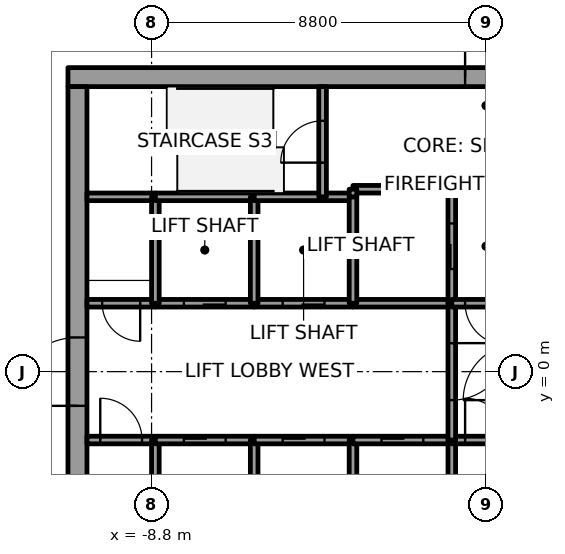
"""IFC4 building model, lengths in metres.
Left out: names, types, materials, properties, quantities, classifications, styles, units other than length and angle.
Written with IfcOpenShell. Run it as: python <this file> out.ifc"""

import sys

from ifc_helpers import new_model, si_unit, direction, frame, frame_2d, origin, place, context, subcontext, project, spatial, rectangle, extrude, element, fill, save


model = new_model("IFC4")
c1 = context("Model", 3, precision=1e-05, world=origin(), true_north=direction((0.0, 1.0)))
c2 = subcontext(c1, "Body", "Model", "MODEL_VIEW")
j1 = project(units=[si_unit("LENGTHUNIT", "METRE"), si_unit("PLANEANGLEUNIT", "RADIAN")], contexts=[c1])
p1 = place(None, origin())
s1 = spatial("IfcSite", under=j1, at=p1, CompositionType="ELEMENT")
p2 = place(p1, origin())
s2 = spatial("IfcBuilding", under=s1, at=p2, CompositionType="ELEMENT")
p3 = place(p2, frame((0.0, 0.0, 118.6)))
s3 = spatial("IfcBuildingStorey", under=s2, at=p3, CompositionType="ELEMENT", Elevation=118.6)
p4 = place(p3, frame((-11.0, 7.75, 0.0), z_axis=(0.0, 0.0, 1.0), x_axis=(1.0, 0.0, 0.0)))
e1 = element("IfcWall", 1, at=p4, inside=s3, PredefinedType="SHEAR", context=c2, shape_type="SweptSolid", body=[
    extrude(rectangle(XDim=22.0, YDim=0.5, at=frame_2d((11.0, 0.0))), origin(), (0.0, 0.0, 1.0), 7.2),
])
p5 = place(p4, frame((10.45, 0.0, 0.0)))
e2 = element("IfcOpeningElement", 2, at=p5, cuts=e1, PredefinedType="OPENING", context=c2, shape_type="SweptSolid", body=[
    extrude(rectangle(XDim=1.1, YDim=2.1, at=frame_2d((0.55, 1.05))), frame((0.0, 0.25, 0.0), z_axis=(0.0, -1.0, 0.0), x_axis=(1.0, 0.0, 0.0)), (0.0, 0.0, 1.0), 0.5),
])
p6 = place(p3, frame((-10.75, -7.5, 0.0), z_axis=(0.0, 0.0, 1.0), x_axis=(0.0, 1.0, 0.0)))
e3 = element("IfcWall", 3, at=p6, inside=s3, PredefinedType="SHEAR", context=c2, shape_type="SweptSolid", body=[
    extrude(rectangle(XDim=15.0, YDim=0.5, at=frame_2d((7.5, 0.0))), origin(), (0.0, 0.0, 1.0), 7.2),
])
p7 = place(p6, frame((6.6, 0.0, 0.0)))
e4 = element("IfcOpeningElement", 4, at=p7, cuts=e3, PredefinedType="OPENING", context=c2, shape_type="SweptSolid", body=[
    extrude(rectangle(XDim=1.8, YDim=2.1, at=frame_2d((0.9, 1.05))), frame((0.0, 0.25, 0.0), z_axis=(0.0, -1.0, 0.0), x_axis=(1.0, 0.0, 0.0)), (0.0, 0.0, 1.0), 0.5),
])
p8 = place(p3, frame((-10.5, -1.8, 0.0), z_axis=(0.0, 0.0, 1.0), x_axis=(1.0, 0.0, 0.0)))
e5 = element("IfcWall", 5, at=p8, inside=s3, PredefinedType="SOLIDWALL", context=c2, shape_type="SweptSolid", body=[
    extrude(rectangle(XDim=1.8, YDim=0.2, at=frame_2d((0.9, 0.0))), origin(), (0.0, 0.0, 1.0), 7.05),
])
p9 = place(p8, frame((0.35, 0.0, 0.0)))
e6 = element("IfcOpeningElement", 6, at=p9, cuts=e5, PredefinedType="OPENING", context=c2, shape_type="SweptSolid", body=[
    extrude(rectangle(XDim=1.1, YDim=2.1, at=frame_2d((0.55, 1.05))), frame((0.0, 0.1, 0.0), z_axis=(0.0, -1.0, 0.0), x_axis=(1.0, 0.0, 0.0)), (0.0, 0.0, 1.0), 0.2),
])
p10 = place(p3, frame((-8.7, 1.8, 0.0), z_axis=(0.0, 0.0, 1.0), x_axis=(-1.0, 0.0, 0.0)))
e7 = element("IfcWall", 7, at=p10, inside=s3, PredefinedType="SOLIDWALL", context=c2, shape_type="SweptSolid", body=[
    extrude(rectangle(XDim=1.8, YDim=0.2, at=frame_2d((0.9, 0.0))), origin(), (0.0, 0.0, 1.0), 7.05),
])
p11 = place(p10, frame((0.4, 0.0, 0.0)))
e8 = element("IfcOpeningElement", 8, at=p11, cuts=e7, PredefinedType="OPENING", context=c2, shape_type="SweptSolid", body=[
    extrude(rectangle(XDim=1.0, YDim=2.1, at=frame_2d((0.5, 1.05))), frame((0.0, 0.1, 0.0), z_axis=(0.0, -1.0, 0.0), x_axis=(1.0, 0.0, 0.0)), (0.0, 0.0, 1.0), 0.2),
])
p12 = place(p3, frame((-8.7, 4.6, 0.0), z_axis=(0.0, 0.0, 1.0), x_axis=(-1.0, 0.0, 0.0)))
e9 = element("IfcWall", 9, at=p12, inside=s3, PredefinedType="SOLIDWALL", context=c2, shape_type="SweptSolid", body=[
    extrude(rectangle(XDim=1.8, YDim=0.2, at=frame_2d((0.9, 0.0))), origin(), (0.0, 0.0, 1.0), 7.05),
])
p13 = place(p3, frame((-8.7, -4.6, 0.0), z_axis=(0.0, 0.0, 1.0), x_axis=(0.0, 1.0, 0.0)))
e10 = element("IfcWall", 10, at=p13, inside=s3, PredefinedType="SOLIDWALL", context=c2, shape_type="SweptSolid", body=[
    extrude(rectangle(XDim=2.8, YDim=0.2, at=frame_2d((1.4, 0.0))), origin(), (0.0, 0.0, 1.0), 7.05),
])
p14 = place(p3, frame((-8.7, -1.8, 0.0), z_axis=(0.0, 0.0, 1.0), x_axis=(1.0, 0.0, 0.0)))
e11 = element("IfcWall", 11, at=p14, inside=s3, PredefinedType="SOLIDWALL", context=c2, shape_type="SweptSolid", body=[
    extrude(rectangle(XDim=2.6, YDim=0.2, at=frame_2d((1.3, 0.0))), origin(), (0.0, 0.0, 1.0), 7.05),
])
p15 = place(p14, frame((0.75, 0.0, 0.0)))
e12 = element("IfcOpeningElement", 12, at=p15, cuts=e11, PredefinedType="OPENING", context=c2, shape_type="SweptSolid", body=[
    extrude(rectangle(XDim=1.1, YDim=2.1, at=frame_2d((0.55, 1.05))), frame((0.0, 0.1, 0.0), z_axis=(0.0, -1.0, 0.0), x_axis=(1.0, 0.0, 0.0)), (0.0, 0.0, 1.0), 0.2),
])
p16 = place(p3, frame((-6.1, 1.8, 0.0), z_axis=(0.0, 0.0, 1.0), x_axis=(-1.0, 0.0, 0.0)))
e13 = element("IfcWall", 13, at=p16, inside=s3, PredefinedType="SOLIDWALL", context=c2, shape_type="SweptSolid", body=[
    extrude(rectangle(XDim=2.6, YDim=0.2, at=frame_2d((1.3, 0.0))), origin(), (0.0, 0.0, 1.0), 7.05),
])
p17 = place(p16, frame((0.75, 0.0, 0.0)))
e14 = element("IfcOpeningElement", 14, at=p17, cuts=e13, PredefinedType="OPENING", context=c2, shape_type="SweptSolid", body=[
    extrude(rectangle(XDim=1.1, YDim=2.1, at=frame_2d((0.55, 1.05))), frame((0.0, 0.1, 0.0), z_axis=(0.0, -1.0, 0.0), x_axis=(1.0, 0.0, 0.0)), (0.0, 0.0, 1.0), 0.2),
])
p18 = place(p3, frame((-8.7, 1.8, 0.0), z_axis=(0.0, 0.0, 1.0), x_axis=(0.0, 1.0, 0.0)))
e15 = element("IfcWall", 15, at=p18, inside=s3, PredefinedType="SOLIDWALL", context=c2, shape_type="SweptSolid", body=[
    extrude(rectangle(XDim=2.8, YDim=0.2, at=frame_2d((1.4, 0.0))), origin(), (0.0, 0.0, 1.0), 7.05),
])
p19 = place(p3, frame((-6.1, 4.6, 0.0), z_axis=(0.0, 0.0, 1.0), x_axis=(-1.0, 0.0, 0.0)))
e16 = element("IfcWall", 16, at=p19, inside=s3, PredefinedType="SOLIDWALL", context=c2, shape_type="SweptSolid", body=[
    extrude(rectangle(XDim=2.6, YDim=0.2, at=frame_2d((1.3, 0.0))), origin(), (0.0, 0.0, 1.0), 7.05),
])
p20 = place(p3, frame((-6.1, -4.6, 0.0), z_axis=(0.0, 0.0, 1.0), x_axis=(0.0, 1.0, 0.0)))
e17 = element("IfcWall", 17, at=p20, inside=s3, PredefinedType="SOLIDWALL", context=c2, shape_type="SweptSolid", body=[
    extrude(rectangle(XDim=2.8, YDim=0.2, at=frame_2d((1.4, 0.0))), origin(), (0.0, 0.0, 1.0), 7.05),
])
p21 = place(p3, frame((-6.1, -1.8, 0.0), z_axis=(0.0, 0.0, 1.0), x_axis=(1.0, 0.0, 0.0)))
e18 = element("IfcWall", 18, at=p21, inside=s3, PredefinedType="SOLIDWALL", context=c2, shape_type="SweptSolid", body=[
    extrude(rectangle(XDim=2.6, YDim=0.2, at=frame_2d((1.3, 0.0))), origin(), (0.0, 0.0, 1.0), 7.05),
])
p22 = place(p21, frame((0.75, 0.0, 0.0)))
e19 = element("IfcOpeningElement", 19, at=p22, cuts=e18, PredefinedType="OPENING", context=c2, shape_type="SweptSolid", body=[
    extrude(rectangle(XDim=1.1, YDim=2.1, at=frame_2d((0.55, 1.05))), frame((0.0, 0.1, 0.0), z_axis=(0.0, -1.0, 0.0), x_axis=(1.0, 0.0, 0.0)), (0.0, 0.0, 1.0), 0.2),
])
p23 = place(p3, frame((-3.5, 1.8, 0.0), z_axis=(0.0, 0.0, 1.0), x_axis=(-1.0, 0.0, 0.0)))
e20 = element("IfcWall", 20, at=p23, inside=s3, PredefinedType="SOLIDWALL", context=c2, shape_type="SweptSolid", body=[
    extrude(rectangle(XDim=2.6, YDim=0.2, at=frame_2d((1.3, 0.0))), origin(), (0.0, 0.0, 1.0), 7.05),
])
p24 = place(p23, frame((0.75, 0.0, 0.0)))
e21 = element("IfcOpeningElement", 21, at=p24, cuts=e20, PredefinedType="OPENING", context=c2, shape_type="SweptSolid", body=[
    extrude(rectangle(XDim=1.1, YDim=2.1, at=frame_2d((0.55, 1.05))), frame((0.0, 0.1, 0.0), z_axis=(0.0, -1.0, 0.0), x_axis=(1.0, 0.0, 0.0)), (0.0, 0.0, 1.0), 0.2),
])
p25 = place(p3, frame((-6.1, 1.8, 0.0), z_axis=(0.0, 0.0, 1.0), x_axis=(0.0, 1.0, 0.0)))
e22 = element("IfcWall", 22, at=p25, inside=s3, PredefinedType="SOLIDWALL", context=c2, shape_type="SweptSolid", body=[
    extrude(rectangle(XDim=2.8, YDim=0.2, at=frame_2d((1.4, 0.0))), origin(), (0.0, 0.0, 1.0), 7.05),
])
p26 = place(p3, frame((-4.3, 4.6, 0.0), z_axis=(0.0, 0.0, 1.0), x_axis=(-1.0, 0.0, 0.0)))
e23 = element("IfcWall", 23, at=p26, inside=s3, PredefinedType="SOLIDWALL", context=c2, shape_type="SweptSolid", body=[
    extrude(rectangle(XDim=1.8, YDim=0.2, at=frame_2d((0.9, 0.0))), origin(), (0.0, 0.0, 1.0), 7.05),
])
p27 = place(p3, frame((-3.5, 4.6, 0.0), z_axis=(0.0, 0.0, 1.0), x_axis=(-1.0, 0.0, 0.0)))
e24 = element("IfcWall", 24, at=p27, inside=s3, PredefinedType="SOLIDWALL", context=c2, shape_type="SweptSolid", body=[
    extrude(rectangle(XDim=0.8, YDim=0.2, at=frame_2d((0.4, 0.0))), origin(), (0.0, 0.0, 1.0), 7.05),
])
p28 = place(p3, frame((-4.3, 4.6, 0.0), z_axis=(0.0, 0.0, 1.0), x_axis=(0.0, 1.0, 0.0)))
e25 = element("IfcWall", 25, at=p28, inside=s3, PredefinedType="SOLIDWALL", context=c2, shape_type="SweptSolid", body=[
    extrude(rectangle(XDim=2.9, YDim=0.2, at=frame_2d((1.45, 0.0))), origin(), (0.0, 0.0, 1.0), 7.05),
])
p29 = place(p28, frame((0.9, 0.0, 0.0)))
e26 = element("IfcOpeningElement", 26, at=p29, cuts=e25, PredefinedType="OPENING", context=c2, shape_type="SweptSolid", body=[
    extrude(rectangle(XDim=1.1, YDim=2.1, at=frame_2d((0.55, 1.05))), frame((0.0, 0.1, 0.0), z_axis=(0.0, -1.0, 0.0), x_axis=(1.0, 0.0, 0.0)), (0.0, 0.0, 1.0), 0.2),
])
p30 = place(p3, frame((-3.5, -4.6, 0.0), z_axis=(0.0, 0.0, 1.0), x_axis=(0.0, 1.0, 0.0)))
e27 = element("IfcWall", 27, at=p30, inside=s3, PredefinedType="SOLIDWALL", context=c2, shape_type="SweptSolid", body=[
    extrude(rectangle(XDim=2.8, YDim=0.2, at=frame_2d((1.4, 0.0))), origin(), (0.0, 0.0, 1.0), 7.05),
])
p31 = place(p3, frame((-3.5, -1.8, 0.0), z_axis=(0.0, 0.0, 1.0), x_axis=(1.0, 0.0, 0.0)))
e28 = element("IfcWall", 28, at=p31, inside=s3, PredefinedType="SOLIDWALL", context=c2, shape_type="SweptSolid", body=[
    extrude(rectangle(XDim=2.6, YDim=0.2, at=frame_2d((1.3, 0.0))), origin(), (0.0, 0.0, 1.0), 7.05),
])
p32 = place(p31, frame((0.75, 0.0, 0.0)))
e29 = element("IfcOpeningElement", 29, at=p32, cuts=e28, PredefinedType="OPENING", context=c2, shape_type="SweptSolid", body=[
    extrude(rectangle(XDim=1.1, YDim=2.1, at=frame_2d((0.55, 1.05))), frame((0.0, 0.1, 0.0), z_axis=(0.0, -1.0, 0.0), x_axis=(1.0, 0.0, 0.0)), (0.0, 0.0, 1.0), 0.2),
])
p33 = place(p3, frame((-0.9, 1.8, 0.0), z_axis=(0.0, 0.0, 1.0), x_axis=(-1.0, 0.0, 0.0)))
e30 = element("IfcWall", 30, at=p33, inside=s3, PredefinedType="SOLIDWALL", context=c2, shape_type="SweptSolid", body=[
    extrude(rectangle(XDim=2.6, YDim=0.2, at=frame_2d((1.3, 0.0))), origin(), (0.0, 0.0, 1.0), 7.05),
])
p34 = place(p3, frame((-3.5, 4.6, 0.0), z_axis=(0.0, 0.0, 1.0), x_axis=(0.0, -1.0, 0.0)))
e31 = element("IfcWall", 31, at=p34, inside=s3, PredefinedType="SOLIDWALL", context=c2, shape_type="SweptSolid", body=[
    extrude(rectangle(XDim=2.8, YDim=0.2, at=frame_2d((1.4, 0.0))), origin(), (0.0, 0.0, 1.0), 7.05),
])
p35 = place(p3, frame((-0.9, 1.8, 0.0), z_axis=(0.0, 0.0, 1.0), x_axis=(0.0, 1.0, 0.0)))
e32 = element("IfcWall", 32, at=p35, inside=s3, PredefinedType="SOLIDWALL", context=c2, shape_type="SweptSolid", body=[
    extrude(rectangle(XDim=3.0, YDim=0.2, at=frame_2d((1.5, 0.0))), origin(), (0.0, 0.0, 1.0), 7.05),
])
p36 = place(p35, frame((0.9, 0.0, 0.0)))
e33 = element("IfcOpeningElement", 33, at=p36, cuts=e32, PredefinedType="OPENING", context=c2, shape_type="SweptSolid", body=[
    extrude(rectangle(XDim=1.2, YDim=2.1, at=frame_2d((0.6, 1.05))), frame((0.0, 0.1, 0.0), z_axis=(0.0, -1.0, 0.0), x_axis=(1.0, 0.0, 0.0)), (0.0, 0.0, 1.0), 0.2),
])
p37 = place(p3, frame((-0.9, 4.8, 0.0), z_axis=(0.0, 0.0, 1.0), x_axis=(-1.0, 0.0, 0.0)))
e34 = element("IfcWall", 34, at=p37, inside=s3, PredefinedType="SOLIDWALL", context=c2, shape_type="SweptSolid", body=[
    extrude(rectangle(XDim=2.6, YDim=0.2, at=frame_2d((1.3, 0.0))), origin(), (0.0, 0.0, 1.0), 7.05),
])
p38 = place(p3, frame((-3.5, 4.8, 0.0), z_axis=(0.0, 0.0, 1.0), x_axis=(0.0, -1.0, 0.0)))
e35 = element("IfcWall", 35, at=p38, inside=s3, PredefinedType="SOLIDWALL", context=c2, shape_type="SweptSolid", body=[
    extrude(rectangle(XDim=0.2, YDim=0.2, at=frame_2d((0.1, 0.0))), origin(), (0.0, 0.0, 1.0), 7.05),
])
p39 = place(p3, frame((-0.9, -4.6, 0.0), z_axis=(0.0, 0.0, 1.0), x_axis=(0.0, 1.0, 0.0)))
e36 = element("IfcWall", 36, at=p39, inside=s3, PredefinedType="SOLIDWALL", context=c2, shape_type="SweptSolid", body=[
    extrude(rectangle(XDim=2.8, YDim=0.2, at=frame_2d((1.4, 0.0))), origin(), (0.0, 0.0, 1.0), 7.05),
])
p40 = place(p3, frame((-0.9, -1.8, 0.0), z_axis=(0.0, 0.0, 1.0), x_axis=(1.0, 0.0, 0.0)))
e37 = element("IfcWall", 37, at=p40, inside=s3, PredefinedType="SOLIDWALL", context=c2, shape_type="SweptSolid", body=[
    extrude(rectangle(XDim=1.8, YDim=0.2, at=frame_2d((0.9, 0.0))), origin(), (0.0, 0.0, 1.0), 7.05),
])
p41 = place(p40, frame((0.35, 0.0, 0.0)))
e38 = element("IfcOpeningElement", 38, at=p41, cuts=e37, PredefinedType="OPENING", context=c2, shape_type="SweptSolid", body=[
    extrude(rectangle(XDim=1.1, YDim=2.1, at=frame_2d((0.55, 1.05))), frame((0.0, 0.1, 0.0), z_axis=(0.0, -1.0, 0.0), x_axis=(1.0, 0.0, 0.0)), (0.0, 0.0, 1.0), 0.2),
])
p42 = place(p3, frame((-0.9, 1.8, 0.0), z_axis=(0.0, 0.0, 1.0), x_axis=(0.0, -1.0, 0.0)))
e39 = element("IfcWall", 39, at=p42, inside=s3, PredefinedType="SOLIDWALL", context=c2, shape_type="SweptSolid", body=[
    extrude(rectangle(XDim=3.6, YDim=0.2, at=frame_2d((1.8, 0.0))), origin(), (0.0, 0.0, 1.0), 7.05),
])
p43 = place(p42, frame((1.05, 0.0, 0.0)))
e40 = element("IfcOpeningElement", 40, at=p43, cuts=e39, PredefinedType="OPENING", context=c2, shape_type="SweptSolid", body=[
    extrude(rectangle(XDim=1.5, YDim=2.1, at=frame_2d((0.75, 1.05))), frame((0.0, 0.1, 0.0), z_axis=(0.0, -1.0, 0.0), x_axis=(1.0, 0.0, 0.0)), (0.0, 0.0, 1.0), 0.2),
])
p44 = place(p3, frame((0.9, 1.8, 0.0), z_axis=(0.0, 0.0, 1.0), x_axis=(-1.0, 0.0, 0.0)))
e41 = element("IfcWall", 41, at=p44, inside=s3, PredefinedType="SOLIDWALL", context=c2, shape_type="SweptSolid", body=[
    extrude(rectangle(XDim=1.8, YDim=0.2, at=frame_2d((0.9, 0.0))), origin(), (0.0, 0.0, 1.0), 7.05),
])
p45 = place(p44, frame((0.35, 0.0, 0.0)))
e42 = element("IfcOpeningElement", 42, at=p45, cuts=e41, PredefinedType="OPENING", context=c2, shape_type="SweptSolid", body=[
    extrude(rectangle(XDim=1.1, YDim=2.1, at=frame_2d((0.55, 1.05))), frame((0.0, 0.1, 0.0), z_axis=(0.0, -1.0, 0.0), x_axis=(1.0, 0.0, 0.0)), (0.0, 0.0, 1.0), 0.2),
])
p46 = place(p15, origin())
e43 = element("IfcDoor", 43, at=p46, inside=s3, OperationType="SLIDING_TO_LEFT", PredefinedType="DOOR", context=c2, shape_type="SweptSolid", body=[
    extrude(rectangle(XDim=1.1, YDim=2.1, at=frame_2d((0.55, 1.05))), frame((0.0, 0.025, 0.0), z_axis=(0.0, -1.0, 0.0), x_axis=(1.0, 0.0, 0.0)), (0.0, 0.0, 1.0), 0.05),
])
fill(e12, e43)
p47 = place(p22, origin())
e44 = element("IfcDoor", 44, at=p47, inside=s3, OperationType="SLIDING_TO_RIGHT", PredefinedType="DOOR", context=c2, shape_type="SweptSolid", body=[
    extrude(rectangle(XDim=1.1, YDim=2.1, at=frame_2d((0.55, 1.05))), frame((0.0, 0.025, 0.0), z_axis=(0.0, -1.0, 0.0), x_axis=(1.0, 0.0, 0.0)), (0.0, 0.0, 1.0), 0.05),
])
fill(e19, e44)
p48 = place(p32, origin())
e45 = element("IfcDoor", 45, at=p48, inside=s3, OperationType="SLIDING_TO_LEFT", PredefinedType="DOOR", context=c2, shape_type="SweptSolid", body=[
    extrude(rectangle(XDim=1.1, YDim=2.1, at=frame_2d((0.55, 1.05))), frame((0.0, 0.025, 0.0), z_axis=(0.0, -1.0, 0.0), x_axis=(1.0, 0.0, 0.0)), (0.0, 0.0, 1.0), 0.05),
])
fill(e29, e45)
p49 = place(p17, origin())
e46 = element("IfcDoor", 46, at=p49, inside=s3, OperationType="SLIDING_TO_LEFT", PredefinedType="DOOR", context=c2, shape_type="SweptSolid", body=[
    extrude(rectangle(XDim=1.1, YDim=2.1, at=frame_2d((0.55, 1.05))), frame((0.0, 0.025, 0.0), z_axis=(0.0, -1.0, 0.0), x_axis=(1.0, 0.0, 0.0)), (0.0, 0.0, 1.0), 0.05),
])
fill(e14, e46)
p50 = place(p24, origin())
e47 = element("IfcDoor", 47, at=p50, inside=s3, OperationType="SLIDING_TO_RIGHT", PredefinedType="DOOR", context=c2, shape_type="SweptSolid", body=[
    extrude(rectangle(XDim=1.1, YDim=2.1, at=frame_2d((0.55, 1.05))), frame((0.0, 0.025, 0.0), z_axis=(0.0, -1.0, 0.0), x_axis=(1.0, 0.0, 0.0)), (0.0, 0.0, 1.0), 0.05),
])
fill(e21, e47)
p51 = place(p36, origin())
e48 = element("IfcDoor", 48, at=p51, inside=s3, OperationType="SLIDING_TO_RIGHT", PredefinedType="DOOR", context=c2, shape_type="SweptSolid", body=[
    extrude(rectangle(XDim=1.2, YDim=2.1, at=frame_2d((0.6, 1.05))), frame((0.0, 0.025, 0.0), z_axis=(0.0, -1.0, 0.0), x_axis=(1.0, 0.0, 0.0)), (0.0, 0.0, 1.0), 0.05),
])
fill(e33, e48)
p52 = place(p43, origin())
e49 = element("IfcDoor", 49, at=p52, inside=s3, OperationType="DOUBLE_DOOR_SINGLE_SWING", PredefinedType="DOOR", context=c2, shape_type="SweptSolid", body=[
    extrude(rectangle(XDim=1.5, YDim=2.1, at=frame_2d((0.75, 1.05))), frame((0.0, 0.025, 0.0), z_axis=(0.0, -1.0, 0.0), x_axis=(1.0, 0.0, 0.0)), (0.0, 0.0, 1.0), 0.05),
])
fill(e40, e49)
p53 = place(p9, origin())
e50 = element("IfcDoor", 50, at=p53, inside=s3, OperationType="SINGLE_SWING_RIGHT", PredefinedType="DOOR", context=c2, shape_type="SweptSolid", body=[
    extrude(rectangle(XDim=1.1, YDim=2.1, at=frame_2d((0.55, 1.05))), frame((0.0, 0.025, 0.0), z_axis=(0.0, -1.0, 0.0), x_axis=(1.0, 0.0, 0.0)), (0.0, 0.0, 1.0), 0.05),
])
fill(e6, e50)
p54 = place(p45, origin())
e51 = element("IfcDoor", 51, at=p54, inside=s3, OperationType="SINGLE_SWING_RIGHT", PredefinedType="DOOR", context=c2, shape_type="SweptSolid", body=[
    extrude(rectangle(XDim=1.1, YDim=2.1, at=frame_2d((0.55, 1.05))), frame((0.0, 0.025, 0.0), z_axis=(0.0, -1.0, 0.0), x_axis=(1.0, 0.0, 0.0)), (0.0, 0.0, 1.0), 0.05),
])
fill(e42, e51)
p55 = place(p41, origin())
e52 = element("IfcDoor", 52, at=p55, inside=s3, OperationType="SINGLE_SWING_LEFT", PredefinedType="DOOR", context=c2, shape_type="SweptSolid", body=[
    extrude(rectangle(XDim=1.1, YDim=2.1, at=frame_2d((0.55, 1.05))), frame((0.0, 0.025, 0.0), z_axis=(0.0, -1.0, 0.0), x_axis=(1.0, 0.0, 0.0)), (0.0, 0.0, 1.0), 0.05),
])
fill(e38, e52)
p56 = place(p11, origin())
e53 = element("IfcDoor", 53, at=p56, inside=s3, OperationType="SINGLE_SWING_RIGHT", PredefinedType="DOOR", context=c2, shape_type="SweptSolid", body=[
    extrude(rectangle(XDim=1.0, YDim=2.1, at=frame_2d((0.5, 1.05))), frame((0.0, 0.025, 0.0), z_axis=(0.0, -1.0, 0.0), x_axis=(1.0, 0.0, 0.0)), (0.0, 0.0, 1.0), 0.05),
])
fill(e8, e53)
p57 = place(p29, origin())
e54 = element("IfcDoor", 54, at=p57, inside=s3, OperationType="SINGLE_SWING_LEFT", PredefinedType="DOOR", context=c2, shape_type="SweptSolid", body=[
    extrude(rectangle(XDim=1.1, YDim=2.1, at=frame_2d((0.55, 1.05))), frame((0.0, 0.025, 0.0), z_axis=(0.0, -1.0, 0.0), x_axis=(1.0, 0.0, 0.0)), (0.0, 0.0, 1.0), 0.05),
])
fill(e26, e54)
p58 = place(p7, origin())
e55 = element("IfcDoor", 55, at=p58, inside=s3, OperationType="DOUBLE_DOOR_SINGLE_SWING", PredefinedType="DOOR", context=c2, shape_type="SweptSolid", body=[
    extrude(rectangle(XDim=1.8, YDim=2.1, at=frame_2d((0.9, 1.05))), frame((0.0, 0.025, 0.0), z_axis=(0.0, -1.0, 0.0), x_axis=(1.0, 0.0, 0.0)), (0.0, 0.0, 1.0), 0.05),
])
fill(e4, e55)
p59 = place(p5, origin())
e56 = element("IfcDoor", 56, at=p59, inside=s3, OperationType="SINGLE_SWING_LEFT", PredefinedType="DOOR", context=c2, shape_type="SweptSolid", body=[
    extrude(rectangle(XDim=1.1, YDim=2.1, at=frame_2d((0.55, 1.05))), frame((0.0, 0.025, 0.0), z_axis=(0.0, -1.0, 0.0), x_axis=(1.0, 0.0, 0.0)), (0.0, 0.0, 1.0), 0.05),
])
fill(e2, e56)
save(model, sys.argv[1])
